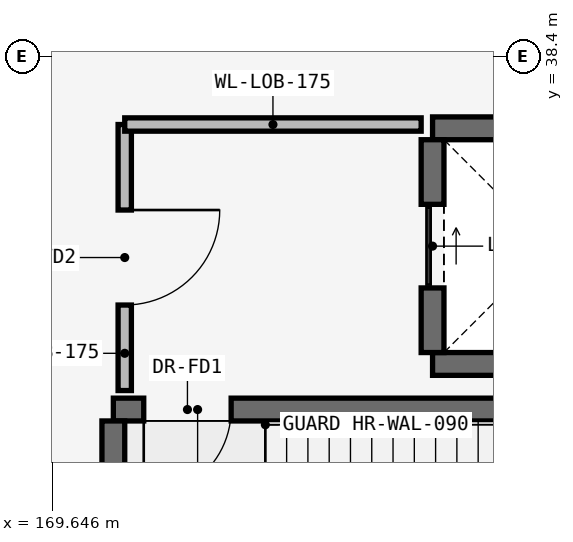
"""IFC4 building model, lengths in metres.
Left out: names, types, materials, properties, quantities, classifications, styles, units other than length and angle.
Written with IfcOpenShell. Run it as: python <this file> out.ifc"""

import sys

from ifc_helpers import new_model, si_unit, direction, frame, frame_2d, origin, place, context, subcontext, project, spatial, rectangle, extrude, element, fill, save


model = new_model("IFC4")
c1 = context("Model", 3, precision=1e-05, world=origin(), true_north=direction((0.0, 1.0)))
c2 = subcontext(c1, "Body", "Model", "MODEL_VIEW")
j1 = project(units=[si_unit("LENGTHUNIT", "METRE"), si_unit("PLANEANGLEUNIT", "RADIAN")], contexts=[c1])
p1 = place(None, origin())
s1 = spatial("IfcSite", under=j1, at=p1, CompositionType="ELEMENT")
p2 = place(p1, origin())
s2 = spatial("IfcBuilding", under=s1, at=p2, CompositionType="ELEMENT")
p3 = place(p2, frame((0.0, 0.0, 10.2)))
s3 = spatial("IfcBuildingStorey", under=s2, at=p3, CompositionType="ELEMENT", Elevation=10.2)
p4 = place(p3, frame((170.45, 33.75, 0.0), z_axis=(0.0, 0.0, 1.0), x_axis=(1.0, 0.0, 0.0)))
e1 = element("IfcWall", 1, at=p4, inside=s3, PredefinedType="SHEAR", context=c2, shape_type="SweptSolid", body=[
    extrude(rectangle(XDim=7.92, YDim=0.3, at=frame_2d((3.96, 0.0))), origin(), (0.0, 0.0, 1.0), 3.94),
])
p5 = place(p4, frame((0.4, 0.0, 0.0)))
e2 = element("IfcOpeningElement", 2, at=p5, cuts=e1, PredefinedType="OPENING", context=c2, shape_type="SweptSolid", body=[
    extrude(rectangle(XDim=1.15, YDim=2.15, at=frame_2d((0.575, 1.075))), frame((0.0, 0.165, 0.0), z_axis=(0.0, -1.0, 0.0), x_axis=(1.0, 0.0, 0.0)), (0.0, 0.0, 1.0), 0.33),
])
p6 = place(p3, frame((170.45, 29.7, 0.0), z_axis=(0.0, 0.0, 1.0), x_axis=(0.0, 1.0, 0.0)))
e3 = element("IfcWall", 3, at=p6, inside=s3, PredefinedType="SHEAR", context=c2, shape_type="SweptSolid", body=[
    extrude(rectangle(XDim=3.9, YDim=0.3, at=frame_2d((1.95, 0.0))), origin(), (0.0, 0.0, 1.0), 3.94),
])
for number, where, z_axis, x_axis in (
    (4, (174.65, 34.35, 0.0), (0.0, 0.0, 1.0), (1.0, 0.0, 0.0)),
    (5, (174.65, 37.45, 0.0), (0.0, 0.0, 1.0), (1.0, 0.0, 0.0)),
):
    element("IfcWall", number, at=place(p3, frame(where, z_axis=z_axis, x_axis=x_axis)), inside=s3, PredefinedType="SHEAR", context=c2, shape_type="SweptSolid", body=[
        extrude(rectangle(XDim=3.1, YDim=0.3, at=frame_2d((1.55, 0.0))), origin(), (0.0, 0.0, 1.0), 3.94),
    ])
p7 = place(p3, frame((174.65, 34.5, 0.0), z_axis=(0.0, 0.0, 1.0), x_axis=(0.0, 1.0, 0.0)))
e6 = element("IfcWall", 6, at=p7, inside=s3, PredefinedType="SHEAR", context=c2, shape_type="SweptSolid", body=[
    extrude(rectangle(XDim=2.8, YDim=0.3, at=frame_2d((1.4, 0.0))), origin(), (0.0, 0.0, 1.0), 3.94),
])
p8 = place(p7, frame((0.85, 0.0, 0.0)))
e7 = element("IfcOpeningElement", 7, at=p8, cuts=e6, PredefinedType="OPENING", context=c2, shape_type="SweptSolid", body=[
    extrude(rectangle(XDim=1.1, YDim=2.15, at=frame_2d((0.55, 1.075))), frame((0.0, 0.165, 0.0), z_axis=(0.0, -1.0, 0.0), x_axis=(1.0, 0.0, 0.0)), (0.0, 0.0, 1.0), 0.33),
])
p9 = place(p3, frame((170.6, 34.0, 0.0), z_axis=(0.0, 0.0, 1.0), x_axis=(0.0, 1.0, 0.0)))
e8 = element("IfcWall", 8, at=p9, inside=s3, PredefinedType="PARTITIONING", context=c2, shape_type="SweptSolid", body=[
    extrude(rectangle(XDim=3.5, YDim=0.175, at=frame_2d((1.75, 0.0))), origin(), (0.0, 0.0, 1.0), 3.94),
])
p10 = place(p9, frame((1.125, 0.0, 0.0)))
e9 = element("IfcOpeningElement", 9, at=p10, cuts=e8, PredefinedType="OPENING", context=c2, shape_type="SweptSolid", body=[
    extrude(rectangle(XDim=1.25, YDim=2.2, at=frame_2d((0.625, 1.1))), frame((0.0, 0.103, 0.0), z_axis=(0.0, -1.0, 0.0), x_axis=(1.0, 0.0, 0.0)), (0.0, 0.0, 1.0), 0.205),
])
p11 = place(p3, frame((170.6, 37.5, 0.0), z_axis=(0.0, 0.0, 1.0), x_axis=(1.0, 0.0, 0.0)))
e10 = element("IfcWall", 10, at=p11, inside=s3, PredefinedType="PARTITIONING", context=c2, shape_type="SweptSolid", body=[
    extrude(rectangle(XDim=3.9, YDim=0.175, at=frame_2d((1.95, 0.0))), origin(), (0.0, 0.0, 1.0), 3.94),
])
p12 = place(p5, frame((1.15, 0.0, 0.0), z_axis=(0.0, 0.0, 1.0), x_axis=(-1.0, 0.0, 0.0)))
e11 = element("IfcDoor", 11, at=p12, inside=s3, OperationType="SINGLE_SWING_LEFT", PredefinedType="DOOR", context=c2, shape_type="SweptSolid", body=[
    extrude(rectangle(XDim=1.15, YDim=2.15, at=frame_2d((0.575, 1.075))), frame((0.0, 0.025, 0.0), z_axis=(0.0, -1.0, 0.0), x_axis=(1.0, 0.0, 0.0)), (0.0, 0.0, 1.0), 0.05),
])
fill(e2, e11)
p13 = place(p8, origin())
e12 = element("IfcDoor", 12, at=p13, inside=s3, OperationType="SLIDING_TO_LEFT", PredefinedType="DOOR", context=c2, shape_type="SweptSolid", body=[
    extrude(rectangle(XDim=1.1, YDim=2.15, at=frame_2d((0.55, 1.075))), frame((0.0, 0.025, 0.0), z_axis=(0.0, -1.0, 0.0), x_axis=(1.0, 0.0, 0.0)), (0.0, 0.0, 1.0), 0.05),
])
fill(e7, e12)
p14 = place(p10, frame((1.25, 0.0, 0.0), z_axis=(0.0, 0.0, 1.0), x_axis=(-1.0, 0.0, 0.0)))
e13 = element("IfcDoor", 13, at=p14, inside=s3, OperationType="SINGLE_SWING_RIGHT", PredefinedType="DOOR", context=c2, shape_type="SweptSolid", body=[
    extrude(rectangle(XDim=1.25, YDim=2.2, at=frame_2d((0.625, 1.1))), frame((0.0, 0.025, 0.0), z_axis=(0.0, -1.0, 0.0), x_axis=(1.0, 0.0, 0.0)), (0.0, 0.0, 1.0), 0.05),
])
fill(e9, e13)
save(model, sys.argv[1])
